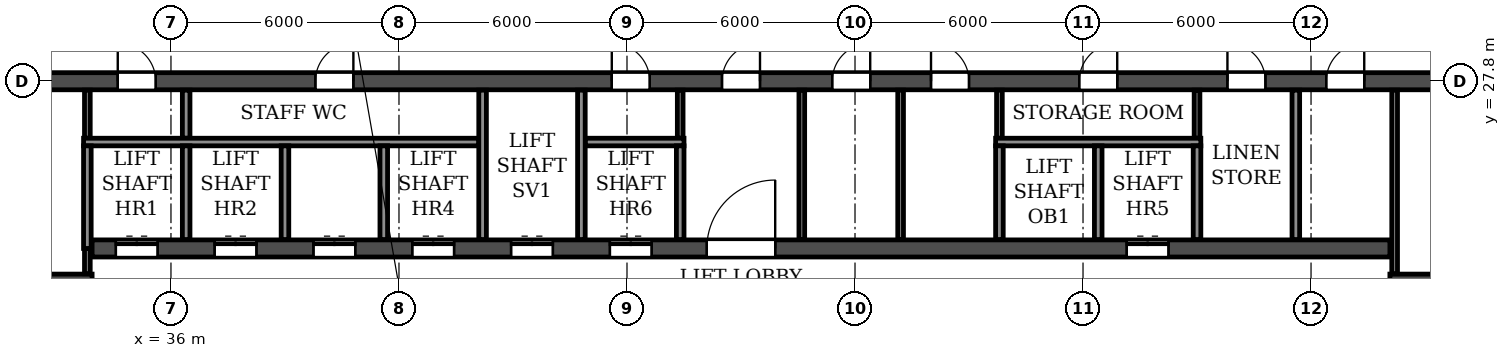
"""IFC4 building model, lengths in metres.
Left out: names, types, materials, properties, quantities, classifications, styles, units other than length and angle.
Written with IfcOpenShell. Run it as: python <this file> out.ifc"""

import sys

from ifc_helpers import new_model, si_unit, direction, frame, frame_2d, origin, place, context, subcontext, project, spatial, rectangle, extrude, element, fill, save


model = new_model("IFC4")
c1 = context("Model", 3, precision=1e-05, world=origin(), true_north=direction((0.0, 1.0)))
c2 = subcontext(c1, "Body", "Model", "MODEL_VIEW")
j1 = project(units=[si_unit("LENGTHUNIT", "METRE"), si_unit("PLANEANGLEUNIT", "RADIAN")], contexts=[c1])
p1 = place(None, origin())
s1 = spatial("IfcSite", under=j1, at=p1, CompositionType="ELEMENT")
p2 = place(p1, origin())
s2 = spatial("IfcBuilding", under=s1, at=p2, CompositionType="ELEMENT")
p3 = place(p2, frame((0.0, 0.0, 132.3)))
s3 = spatial("IfcBuildingStorey", under=s2, at=p3, CompositionType="ELEMENT", Elevation=132.3)
p4 = place(p3, frame((12.2, 27.8, 0.0), z_axis=(0.0, 0.0, 1.0), x_axis=(1.0, 0.0, 0.0)))
e1 = element("IfcWall", 1, at=p4, inside=s3, PredefinedType="SOLIDWALL", context=c2, shape_type="SweptSolid", body=[
    extrude(rectangle(XDim=77.6, YDim=0.45, at=frame_2d((38.8, 0.0))), origin(), (0.0, 0.0, 1.0), 3.07),
])
p5 = place(p4, frame((2.05, 0.0, 0.0)))
e2 = element("IfcOpeningElement", 2, at=p5, cuts=e1, PredefinedType="OPENING", context=c2, shape_type="SweptSolid", body=[
    extrude(rectangle(XDim=1.5, YDim=2.1, at=frame_2d((0.75, 1.05))), frame((0.0, 0.235, 0.0), z_axis=(0.0, -1.0, 0.0), x_axis=(1.0, 0.0, 0.0)), (0.0, 0.0, 1.0), 0.47),
])
p6 = place(p4, frame((6.7, 0.0, 0.0)))
e3 = element("IfcOpeningElement", 3, at=p6, cuts=e1, PredefinedType="OPENING", context=c2, shape_type="SweptSolid", body=[
    extrude(rectangle(XDim=1.0, YDim=2.1, at=frame_2d((0.5, 1.05))), frame((0.0, 0.235, 0.0), z_axis=(0.0, -1.0, 0.0), x_axis=(1.0, 0.0, 0.0)), (0.0, 0.0, 1.0), 0.47),
])
p7 = place(p4, frame((10.05, 0.0, 0.0)))
e4 = element("IfcOpeningElement", 4, at=p7, cuts=e1, PredefinedType="OPENING", context=c2, shape_type="SweptSolid", body=[
    extrude(rectangle(XDim=0.9, YDim=2.1, at=frame_2d((0.45, 1.05))), frame((0.0, 0.235, 0.0), z_axis=(0.0, -1.0, 0.0), x_axis=(1.0, 0.0, 0.0)), (0.0, 0.0, 1.0), 0.47),
])
p8 = place(p4, frame((19.25, 0.0, 0.0)))
e5 = element("IfcOpeningElement", 5, at=p8, cuts=e1, PredefinedType="OPENING", context=c2, shape_type="SweptSolid", body=[
    extrude(rectangle(XDim=0.9, YDim=2.1, at=frame_2d((0.45, 1.05))), frame((0.0, 0.235, 0.0), z_axis=(0.0, -1.0, 0.0), x_axis=(1.0, 0.0, 0.0)), (0.0, 0.0, 1.0), 0.47),
])
p9 = place(p4, frame((22.4, 0.0, 0.0)))
e6 = element("IfcOpeningElement", 6, at=p9, cuts=e1, PredefinedType="OPENING", context=c2, shape_type="SweptSolid", body=[
    extrude(rectangle(XDim=1.0, YDim=2.1, at=frame_2d((0.5, 1.05))), frame((0.0, 0.235, 0.0), z_axis=(0.0, -1.0, 0.0), x_axis=(1.0, 0.0, 0.0)), (0.0, 0.0, 1.0), 0.47),
])
p10 = place(p4, frame((27.6, 0.0, 0.0)))
e7 = element("IfcOpeningElement", 7, at=p10, cuts=e1, PredefinedType="OPENING", context=c2, shape_type="SweptSolid", body=[
    extrude(rectangle(XDim=1.0, YDim=2.1, at=frame_2d((0.5, 1.05))), frame((0.0, 0.235, 0.0), z_axis=(0.0, -1.0, 0.0), x_axis=(1.0, 0.0, 0.0)), (0.0, 0.0, 1.0), 0.47),
])
p11 = place(p4, frame((35.4, 0.0, 0.0)))
e8 = element("IfcOpeningElement", 8, at=p11, cuts=e1, PredefinedType="OPENING", context=c2, shape_type="SweptSolid", body=[
    extrude(rectangle(XDim=1.0, YDim=2.1, at=frame_2d((0.5, 1.05))), frame((0.0, 0.235, 0.0), z_axis=(0.0, -1.0, 0.0), x_axis=(1.0, 0.0, 0.0)), (0.0, 0.0, 1.0), 0.47),
])
p12 = place(p4, frame((38.3, 0.0, 0.0)))
e9 = element("IfcOpeningElement", 9, at=p12, cuts=e1, PredefinedType="OPENING", context=c2, shape_type="SweptSolid", body=[
    extrude(rectangle(XDim=1.0, YDim=2.1, at=frame_2d((0.5, 1.05))), frame((0.0, 0.235, 0.0), z_axis=(0.0, -1.0, 0.0), x_axis=(1.0, 0.0, 0.0)), (0.0, 0.0, 1.0), 0.47),
])
p13 = place(p4, frame((41.2, 0.0, 0.0)))
e10 = element("IfcOpeningElement", 10, at=p13, cuts=e1, PredefinedType="OPENING", context=c2, shape_type="SweptSolid", body=[
    extrude(rectangle(XDim=1.0, YDim=2.1, at=frame_2d((0.5, 1.05))), frame((0.0, 0.235, 0.0), z_axis=(0.0, -1.0, 0.0), x_axis=(1.0, 0.0, 0.0)), (0.0, 0.0, 1.0), 0.47),
])
p14 = place(p4, frame((43.8, 0.0, 0.0)))
e11 = element("IfcOpeningElement", 11, at=p14, cuts=e1, PredefinedType="OPENING", context=c2, shape_type="SweptSolid", body=[
    extrude(rectangle(XDim=1.0, YDim=2.1, at=frame_2d((0.5, 1.05))), frame((0.0, 0.235, 0.0), z_axis=(0.0, -1.0, 0.0), x_axis=(1.0, 0.0, 0.0)), (0.0, 0.0, 1.0), 0.47),
])
p15 = place(p4, frame((47.7, 0.0, 0.0)))
e12 = element("IfcOpeningElement", 12, at=p15, cuts=e1, PredefinedType="OPENING", context=c2, shape_type="SweptSolid", body=[
    extrude(rectangle(XDim=1.0, YDim=2.1, at=frame_2d((0.5, 1.05))), frame((0.0, 0.235, 0.0), z_axis=(0.0, -1.0, 0.0), x_axis=(1.0, 0.0, 0.0)), (0.0, 0.0, 1.0), 0.47),
])
p16 = place(p4, frame((51.6, 0.0, 0.0)))
e13 = element("IfcOpeningElement", 13, at=p16, cuts=e1, PredefinedType="OPENING", context=c2, shape_type="SweptSolid", body=[
    extrude(rectangle(XDim=1.0, YDim=2.1, at=frame_2d((0.5, 1.05))), frame((0.0, 0.235, 0.0), z_axis=(0.0, -1.0, 0.0), x_axis=(1.0, 0.0, 0.0)), (0.0, 0.0, 1.0), 0.47),
])
p17 = place(p4, frame((54.2, 0.0, 0.0)))
e14 = element("IfcOpeningElement", 14, at=p17, cuts=e1, PredefinedType="OPENING", context=c2, shape_type="SweptSolid", body=[
    extrude(rectangle(XDim=1.0, YDim=2.1, at=frame_2d((0.5, 1.05))), frame((0.0, 0.235, 0.0), z_axis=(0.0, -1.0, 0.0), x_axis=(1.0, 0.0, 0.0)), (0.0, 0.0, 1.0), 0.47),
])
p18 = place(p4, frame((57.45, 0.0, 0.0)))
e15 = element("IfcOpeningElement", 15, at=p18, cuts=e1, PredefinedType="OPENING", context=c2, shape_type="SweptSolid", body=[
    extrude(rectangle(XDim=0.9, YDim=2.1, at=frame_2d((0.45, 1.05))), frame((0.0, 0.235, 0.0), z_axis=(0.0, -1.0, 0.0), x_axis=(1.0, 0.0, 0.0)), (0.0, 0.0, 1.0), 0.47),
])
p19 = place(p4, frame((66.65, 0.0, 0.0)))
e16 = element("IfcOpeningElement", 16, at=p19, cuts=e1, PredefinedType="OPENING", context=c2, shape_type="SweptSolid", body=[
    extrude(rectangle(XDim=0.9, YDim=2.1, at=frame_2d((0.45, 1.05))), frame((0.0, 0.235, 0.0), z_axis=(0.0, -1.0, 0.0), x_axis=(1.0, 0.0, 0.0)), (0.0, 0.0, 1.0), 0.47),
])
p20 = place(p4, frame((69.9, 0.0, 0.0)))
e17 = element("IfcOpeningElement", 17, at=p20, cuts=e1, PredefinedType="OPENING", context=c2, shape_type="SweptSolid", body=[
    extrude(rectangle(XDim=1.0, YDim=2.1, at=frame_2d((0.5, 1.05))), frame((0.0, 0.235, 0.0), z_axis=(0.0, -1.0, 0.0), x_axis=(1.0, 0.0, 0.0)), (0.0, 0.0, 1.0), 0.47),
])
p21 = place(p4, frame((74.3, 0.0, 0.0)))
e18 = element("IfcOpeningElement", 18, at=p21, cuts=e1, PredefinedType="OPENING", context=c2, shape_type="SweptSolid", body=[
    extrude(rectangle(XDim=1.0, YDim=2.1, at=frame_2d((0.5, 1.05))), frame((0.0, 0.235, 0.0), z_axis=(0.0, -1.0, 0.0), x_axis=(1.0, 0.0, 0.0)), (0.0, 0.0, 1.0), 0.47),
])
p22 = place(p3, frame((33.925, 23.4, 0.0), z_axis=(0.0, 0.0, 1.0), x_axis=(1.0, 0.0, 0.0)))
e19 = element("IfcWall", 19, at=p22, inside=s3, PredefinedType="SOLIDWALL", context=c2, shape_type="SweptSolid", body=[
    extrude(rectangle(XDim=34.15, YDim=0.45, at=frame_2d((17.075, 0.0))), origin(), (0.0, 0.0, 1.0), 3.07),
])
p23 = place(p22, frame((16.175, 0.0, 0.0)))
e20 = element("IfcOpeningElement", 20, at=p23, cuts=e19, PredefinedType="OPENING", context=c2, shape_type="SweptSolid", body=[
    extrude(rectangle(XDim=1.8, YDim=2.1, at=frame_2d((0.9, 1.05))), frame((0.0, 0.235, 0.0), z_axis=(0.0, -1.0, 0.0), x_axis=(1.0, 0.0, 0.0)), (0.0, 0.0, 1.0), 0.47),
])
p24 = place(p22, frame((0.625, 0.0, 0.0)))
e21 = element("IfcOpeningElement", 21, at=p24, cuts=e19, PredefinedType="OPENING", context=c2, shape_type="SweptSolid", body=[
    extrude(rectangle(XDim=1.1, YDim=2.1, at=frame_2d((0.55, 1.05))), frame((0.0, 0.235, 0.0), z_axis=(0.0, -1.0, 0.0), x_axis=(1.0, 0.0, 0.0)), (0.0, 0.0, 1.0), 0.47),
])
p25 = place(p22, frame((3.225, 0.0, 0.0)))
e22 = element("IfcOpeningElement", 22, at=p25, cuts=e19, PredefinedType="OPENING", context=c2, shape_type="SweptSolid", body=[
    extrude(rectangle(XDim=1.1, YDim=2.1, at=frame_2d((0.55, 1.05))), frame((0.0, 0.235, 0.0), z_axis=(0.0, -1.0, 0.0), x_axis=(1.0, 0.0, 0.0)), (0.0, 0.0, 1.0), 0.47),
])
p26 = place(p22, frame((5.825, 0.0, 0.0)))
e23 = element("IfcOpeningElement", 23, at=p26, cuts=e19, PredefinedType="OPENING", context=c2, shape_type="SweptSolid", body=[
    extrude(rectangle(XDim=1.1, YDim=2.1, at=frame_2d((0.55, 1.05))), frame((0.0, 0.235, 0.0), z_axis=(0.0, -1.0, 0.0), x_axis=(1.0, 0.0, 0.0)), (0.0, 0.0, 1.0), 0.47),
])
p27 = place(p22, frame((8.425, 0.0, 0.0)))
e24 = element("IfcOpeningElement", 24, at=p27, cuts=e19, PredefinedType="OPENING", context=c2, shape_type="SweptSolid", body=[
    extrude(rectangle(XDim=1.1, YDim=2.1, at=frame_2d((0.55, 1.05))), frame((0.0, 0.235, 0.0), z_axis=(0.0, -1.0, 0.0), x_axis=(1.0, 0.0, 0.0)), (0.0, 0.0, 1.0), 0.47),
])
p28 = place(p22, frame((11.025, 0.0, 0.0)))
e25 = element("IfcOpeningElement", 25, at=p28, cuts=e19, PredefinedType="OPENING", context=c2, shape_type="SweptSolid", body=[
    extrude(rectangle(XDim=1.1, YDim=2.1, at=frame_2d((0.55, 1.05))), frame((0.0, 0.235, 0.0), z_axis=(0.0, -1.0, 0.0), x_axis=(1.0, 0.0, 0.0)), (0.0, 0.0, 1.0), 0.47),
])
p29 = place(p22, frame((13.625, 0.0, 0.0)))
e26 = element("IfcOpeningElement", 26, at=p29, cuts=e19, PredefinedType="OPENING", context=c2, shape_type="SweptSolid", body=[
    extrude(rectangle(XDim=1.1, YDim=2.1, at=frame_2d((0.55, 1.05))), frame((0.0, 0.235, 0.0), z_axis=(0.0, -1.0, 0.0), x_axis=(1.0, 0.0, 0.0)), (0.0, 0.0, 1.0), 0.47),
])
p30 = place(p22, frame((27.225, 0.0, 0.0)))
e27 = element("IfcOpeningElement", 27, at=p30, cuts=e19, PredefinedType="OPENING", context=c2, shape_type="SweptSolid", body=[
    extrude(rectangle(XDim=1.1, YDim=2.1, at=frame_2d((0.55, 1.05))), frame((0.0, 0.235, 0.0), z_axis=(0.0, -1.0, 0.0), x_axis=(1.0, 0.0, 0.0)), (0.0, 0.0, 1.0), 0.47),
])
for number, where, z_axis, x_axis in (
    (28, (29.875, 22.6, 0.0), (0.0, 0.0, 1.0), (1.0, 0.0, 0.0)),
    (29, (68.075, 22.6, 0.0), (0.0, 0.0, 1.0), (1.0, 0.0, 0.0)),
):
    element("IfcWall", number, at=place(p3, frame(where, z_axis=z_axis, x_axis=x_axis)), inside=s3, PredefinedType="SOLIDWALL", context=c2, shape_type="SweptSolid", body=[
        extrude(rectangle(XDim=4.05, YDim=0.25, at=frame_2d((2.025, 0.0))), origin(), (0.0, 0.0, 1.0), 3.07),
    ])
p31 = place(p3, frame((49.4, 26.3, 0.0), z_axis=(0.0, 0.0, 1.0), x_axis=(0.0, 1.0, 0.0)))
e30 = element("IfcWall", 30, at=p31, inside=s3, PredefinedType="PARTITIONING", context=c2, shape_type="SweptSolid", body=[
    extrude(rectangle(XDim=1.265, YDim=0.15, at=frame_2d((0.632, 0.0))), origin(), (0.0, 0.0, 1.0), 3.07),
])
for number, where, z_axis, x_axis in (
    (31, (52.6, 23.635, 0.0), (0.0, 0.0, 1.0), (0.0, 1.0, 0.0)),
    (32, (55.2, 23.635, 0.0), (0.0, 0.0, 1.0), (0.0, 1.0, 0.0)),
):
    element("IfcWall", number, at=place(p3, frame(where, z_axis=z_axis, x_axis=x_axis)), inside=s3, PredefinedType="PARTITIONING", context=c2, shape_type="SweptSolid", body=[
        extrude(rectangle(XDim=3.93, YDim=0.15, at=frame_2d((1.965, 0.0))), origin(), (0.0, 0.0, 1.0), 3.07),
    ])
for number, where, z_axis, x_axis in (
    (33, (57.8, 26.3, 0.0), (0.0, 0.0, 1.0), (0.0, 1.0, 0.0)),
    (34, (63.0, 26.3, 0.0), (0.0, 0.0, 1.0), (0.0, 1.0, 0.0)),
):
    element("IfcWall", number, at=place(p3, frame(where, z_axis=z_axis, x_axis=x_axis)), inside=s3, PredefinedType="PARTITIONING", context=c2, shape_type="SweptSolid", body=[
        extrude(rectangle(XDim=1.265, YDim=0.15, at=frame_2d((0.632, 0.0))), origin(), (0.0, 0.0, 1.0), 3.07),
    ])
p32 = place(p3, frame((36.4, 26.3, 0.0), z_axis=(0.0, 0.0, 1.0), x_axis=(0.0, 1.0, 0.0)))
e35 = element("IfcWall", 35, at=p32, inside=s3, PredefinedType="PARTITIONING", context=c2, shape_type="SweptSolid", body=[
    extrude(rectangle(XDim=1.265, YDim=0.2, at=frame_2d((0.632, 0.0))), origin(), (0.0, 0.0, 1.0), 3.07),
])
p33 = place(p3, frame((65.6, 23.635, 0.0), z_axis=(0.0, 0.0, 1.0), x_axis=(0.0, 1.0, 0.0)))
e36 = element("IfcWall", 36, at=p33, inside=s3, PredefinedType="PARTITIONING", context=c2, shape_type="SweptSolid", body=[
    extrude(rectangle(XDim=3.93, YDim=0.2, at=frame_2d((1.965, 0.0))), origin(), (0.0, 0.0, 1.0), 3.07),
])
p34 = place(p3, frame((33.8, 22.735, 0.0), z_axis=(0.0, 0.0, 1.0), x_axis=(0.0, 1.0, 0.0)))
e37 = element("IfcWall", 37, at=p34, inside=s3, PredefinedType="PARTITIONING", context=c2, shape_type="SweptSolid", body=[
    extrude(rectangle(XDim=0.665, YDim=0.15, at=frame_2d((0.333, 0.0))), origin(), (0.0, 0.0, 1.0), 3.07),
])
p35 = place(p3, frame((33.8, 26.3, 0.0), z_axis=(0.0, 0.0, 1.0), x_axis=(0.0, 1.0, 0.0)))
e38 = element("IfcWall", 38, at=p35, inside=s3, PredefinedType="PARTITIONING", context=c2, shape_type="SweptSolid", body=[
    extrude(rectangle(XDim=1.265, YDim=0.15, at=frame_2d((0.632, 0.0))), origin(), (0.0, 0.0, 1.0), 3.07),
])
p36 = place(p3, frame((68.2, 22.735, 0.0), z_axis=(0.0, 0.0, 1.0), x_axis=(0.0, 1.0, 0.0)))
e39 = element("IfcWall", 39, at=p36, inside=s3, PredefinedType="PARTITIONING", context=c2, shape_type="SweptSolid", body=[
    extrude(rectangle(XDim=4.83, YDim=0.15, at=frame_2d((2.415, 0.0))), origin(), (0.0, 0.0, 1.0), 3.07),
])
p37 = place(p3, frame((33.7, 26.2, 0.0), z_axis=(0.0, 0.0, 1.0), x_axis=(1.0, 0.0, 0.0)))
e40 = element("IfcWall", 40, at=p37, inside=s3, PredefinedType="PARTITIONING", context=c2, shape_type="SweptSolid", body=[
    extrude(rectangle(XDim=10.4, YDim=0.2, at=frame_2d((5.2, 0.0))), origin(), (0.0, 0.0, 1.0), 3.07),
])
p38 = place(p3, frame((46.9, 26.2, 0.0), z_axis=(0.0, 0.0, 1.0), x_axis=(1.0, 0.0, 0.0)))
e41 = element("IfcWall", 41, at=p38, inside=s3, PredefinedType="PARTITIONING", context=c2, shape_type="SweptSolid", body=[
    extrude(rectangle(XDim=2.6, YDim=0.2, at=frame_2d((1.3, 0.0))), origin(), (0.0, 0.0, 1.0), 3.07),
])
p39 = place(p3, frame((57.7, 26.2, 0.0), z_axis=(0.0, 0.0, 1.0), x_axis=(1.0, 0.0, 0.0)))
e42 = element("IfcWall", 42, at=p39, inside=s3, PredefinedType="PARTITIONING", context=c2, shape_type="SweptSolid", body=[
    extrude(rectangle(XDim=5.4, YDim=0.2, at=frame_2d((2.7, 0.0))), origin(), (0.0, 0.0, 1.0), 3.07),
])
p40 = place(p3, frame((33.8, 23.4, 0.0), z_axis=(0.0, 0.0, 1.0), x_axis=(0.0, 1.0, 0.0)))
e43 = element("IfcWall", 43, at=p40, inside=s3, PredefinedType="PARTITIONING", context=c2, shape_type="SweptSolid", body=[
    extrude(rectangle(XDim=2.7, YDim=0.2, at=frame_2d((1.35, 0.0))), origin(), (0.0, 0.0, 1.0), 3.07),
])
for number, where, z_axis, x_axis in (
    (44, (36.4, 23.635, 0.0), (0.0, 0.0, 1.0), (0.0, 1.0, 0.0)),
    (45, (39.0, 23.635, 0.0), (0.0, 0.0, 1.0), (0.0, 1.0, 0.0)),
    (46, (41.6, 23.635, 0.0), (0.0, 0.0, 1.0), (0.0, 1.0, 0.0)),
):
    element("IfcWall", number, at=place(p3, frame(where, z_axis=z_axis, x_axis=x_axis)), inside=s3, PredefinedType="PARTITIONING", context=c2, shape_type="SweptSolid", body=[
        extrude(rectangle(XDim=2.465, YDim=0.2, at=frame_2d((1.232, 0.0))), origin(), (0.0, 0.0, 1.0), 3.07),
    ])
for number, where, z_axis, x_axis in (
    (47, (44.2, 23.635, 0.0), (0.0, 0.0, 1.0), (0.0, 1.0, 0.0)),
    (48, (46.8, 23.635, 0.0), (0.0, 0.0, 1.0), (0.0, 1.0, 0.0)),
):
    element("IfcWall", number, at=place(p3, frame(where, z_axis=z_axis, x_axis=x_axis)), inside=s3, PredefinedType="PARTITIONING", context=c2, shape_type="SweptSolid", body=[
        extrude(rectangle(XDim=3.93, YDim=0.2, at=frame_2d((1.965, 0.0))), origin(), (0.0, 0.0, 1.0), 3.07),
    ])
for number, where, z_axis, x_axis in (
    (49, (49.4, 23.635, 0.0), (0.0, 0.0, 1.0), (0.0, 1.0, 0.0)),
    (50, (57.8, 23.635, 0.0), (0.0, 0.0, 1.0), (0.0, 1.0, 0.0)),
    (51, (60.4, 23.635, 0.0), (0.0, 0.0, 1.0), (0.0, 1.0, 0.0)),
    (52, (63.0, 23.635, 0.0), (0.0, 0.0, 1.0), (0.0, 1.0, 0.0)),
):
    element("IfcWall", number, at=place(p3, frame(where, z_axis=z_axis, x_axis=x_axis)), inside=s3, PredefinedType="PARTITIONING", context=c2, shape_type="SweptSolid", body=[
        extrude(rectangle(XDim=2.465, YDim=0.2, at=frame_2d((1.232, 0.0))), origin(), (0.0, 0.0, 1.0), 3.07),
    ])
p41 = place(p9, origin())
e53 = element("IfcDoor", 53, at=p41, inside=s3, OperationType="SINGLE_SWING_LEFT", PredefinedType="DOOR", context=c2, shape_type="SweptSolid", body=[
    extrude(rectangle(XDim=1.0, YDim=2.1, at=frame_2d((0.5, 1.05))), frame((0.0, 0.025, 0.0), z_axis=(0.0, -1.0, 0.0), x_axis=(1.0, 0.0, 0.0)), (0.0, 0.0, 1.0), 0.05),
])
fill(e6, e53)
p42 = place(p10, origin())
e54 = element("IfcDoor", 54, at=p42, inside=s3, OperationType="SINGLE_SWING_RIGHT", PredefinedType="DOOR", context=c2, shape_type="SweptSolid", body=[
    extrude(rectangle(XDim=1.0, YDim=2.1, at=frame_2d((0.5, 1.05))), frame((0.0, 0.025, 0.0), z_axis=(0.0, -1.0, 0.0), x_axis=(1.0, 0.0, 0.0)), (0.0, 0.0, 1.0), 0.05),
])
fill(e7, e54)
p43 = place(p11, origin())
e55 = element("IfcDoor", 55, at=p43, inside=s3, OperationType="SINGLE_SWING_LEFT", PredefinedType="DOOR", context=c2, shape_type="SweptSolid", body=[
    extrude(rectangle(XDim=1.0, YDim=2.1, at=frame_2d((0.5, 1.05))), frame((0.0, 0.025, 0.0), z_axis=(0.0, -1.0, 0.0), x_axis=(1.0, 0.0, 0.0)), (0.0, 0.0, 1.0), 0.05),
])
fill(e8, e55)
p44 = place(p12, origin())
e56 = element("IfcDoor", 56, at=p44, inside=s3, OperationType="SINGLE_SWING_RIGHT", PredefinedType="DOOR", context=c2, shape_type="SweptSolid", body=[
    extrude(rectangle(XDim=1.0, YDim=2.1, at=frame_2d((0.5, 1.05))), frame((0.0, 0.025, 0.0), z_axis=(0.0, -1.0, 0.0), x_axis=(1.0, 0.0, 0.0)), (0.0, 0.0, 1.0), 0.05),
])
fill(e9, e56)
p45 = place(p13, origin())
e57 = element("IfcDoor", 57, at=p45, inside=s3, OperationType="SINGLE_SWING_RIGHT", PredefinedType="DOOR", context=c2, shape_type="SweptSolid", body=[
    extrude(rectangle(XDim=1.0, YDim=2.1, at=frame_2d((0.5, 1.05))), frame((0.0, 0.025, 0.0), z_axis=(0.0, -1.0, 0.0), x_axis=(1.0, 0.0, 0.0)), (0.0, 0.0, 1.0), 0.05),
])
fill(e10, e57)
p46 = place(p14, origin())
e58 = element("IfcDoor", 58, at=p46, inside=s3, OperationType="SINGLE_SWING_LEFT", PredefinedType="DOOR", context=c2, shape_type="SweptSolid", body=[
    extrude(rectangle(XDim=1.0, YDim=2.1, at=frame_2d((0.5, 1.05))), frame((0.0, 0.025, 0.0), z_axis=(0.0, -1.0, 0.0), x_axis=(1.0, 0.0, 0.0)), (0.0, 0.0, 1.0), 0.05),
])
fill(e11, e58)
p47 = place(p15, origin())
e59 = element("IfcDoor", 59, at=p47, inside=s3, OperationType="SINGLE_SWING_RIGHT", PredefinedType="DOOR", context=c2, shape_type="SweptSolid", body=[
    extrude(rectangle(XDim=1.0, YDim=2.1, at=frame_2d((0.5, 1.05))), frame((0.0, 0.025, 0.0), z_axis=(0.0, -1.0, 0.0), x_axis=(1.0, 0.0, 0.0)), (0.0, 0.0, 1.0), 0.05),
])
fill(e12, e59)
p48 = place(p16, origin())
e60 = element("IfcDoor", 60, at=p48, inside=s3, OperationType="SINGLE_SWING_LEFT", PredefinedType="DOOR", context=c2, shape_type="SweptSolid", body=[
    extrude(rectangle(XDim=1.0, YDim=2.1, at=frame_2d((0.5, 1.05))), frame((0.0, 0.025, 0.0), z_axis=(0.0, -1.0, 0.0), x_axis=(1.0, 0.0, 0.0)), (0.0, 0.0, 1.0), 0.05),
])
fill(e13, e60)
p49 = place(p17, origin())
e61 = element("IfcDoor", 61, at=p49, inside=s3, OperationType="SINGLE_SWING_RIGHT", PredefinedType="DOOR", context=c2, shape_type="SweptSolid", body=[
    extrude(rectangle(XDim=1.0, YDim=2.1, at=frame_2d((0.5, 1.05))), frame((0.0, 0.025, 0.0), z_axis=(0.0, -1.0, 0.0), x_axis=(1.0, 0.0, 0.0)), (0.0, 0.0, 1.0), 0.05),
])
fill(e14, e61)
p50 = place(p23, origin())
e62 = element("IfcDoor", 62, at=p50, inside=s3, OperationType="DOUBLE_DOOR_SINGLE_SWING", PredefinedType="DOOR", context=c2, shape_type="SweptSolid", body=[
    extrude(rectangle(XDim=1.8, YDim=2.1, at=frame_2d((0.9, 1.05))), frame((0.0, 0.025, 0.0), z_axis=(0.0, -1.0, 0.0), x_axis=(1.0, 0.0, 0.0)), (0.0, 0.0, 1.0), 0.05),
])
fill(e20, e62)
p51 = place(p24, origin())
e63 = element("IfcDoor", 63, at=p51, inside=s3, OperationType="DOUBLE_DOOR_SLIDING", PredefinedType="DOOR", context=c2, shape_type="SweptSolid", body=[
    extrude(rectangle(XDim=1.1, YDim=2.1, at=frame_2d((0.55, 1.05))), frame((0.0, 0.025, 0.0), z_axis=(0.0, -1.0, 0.0), x_axis=(1.0, 0.0, 0.0)), (0.0, 0.0, 1.0), 0.05),
])
fill(e21, e63)
p52 = place(p25, origin())
e64 = element("IfcDoor", 64, at=p52, inside=s3, OperationType="DOUBLE_DOOR_SLIDING", PredefinedType="DOOR", context=c2, shape_type="SweptSolid", body=[
    extrude(rectangle(XDim=1.1, YDim=2.1, at=frame_2d((0.55, 1.05))), frame((0.0, 0.025, 0.0), z_axis=(0.0, -1.0, 0.0), x_axis=(1.0, 0.0, 0.0)), (0.0, 0.0, 1.0), 0.05),
])
fill(e22, e64)
p53 = place(p26, origin())
e65 = element("IfcDoor", 65, at=p53, inside=s3, OperationType="DOUBLE_DOOR_SLIDING", PredefinedType="DOOR", context=c2, shape_type="SweptSolid", body=[
    extrude(rectangle(XDim=1.1, YDim=2.1, at=frame_2d((0.55, 1.05))), frame((0.0, 0.025, 0.0), z_axis=(0.0, -1.0, 0.0), x_axis=(1.0, 0.0, 0.0)), (0.0, 0.0, 1.0), 0.05),
])
fill(e23, e65)
p54 = place(p27, origin())
e66 = element("IfcDoor", 66, at=p54, inside=s3, OperationType="DOUBLE_DOOR_SLIDING", PredefinedType="DOOR", context=c2, shape_type="SweptSolid", body=[
    extrude(rectangle(XDim=1.1, YDim=2.1, at=frame_2d((0.55, 1.05))), frame((0.0, 0.025, 0.0), z_axis=(0.0, -1.0, 0.0), x_axis=(1.0, 0.0, 0.0)), (0.0, 0.0, 1.0), 0.05),
])
fill(e24, e66)
p55 = place(p28, origin())
e67 = element("IfcDoor", 67, at=p55, inside=s3, OperationType="DOUBLE_DOOR_SLIDING", PredefinedType="DOOR", context=c2, shape_type="SweptSolid", body=[
    extrude(rectangle(XDim=1.1, YDim=2.1, at=frame_2d((0.55, 1.05))), frame((0.0, 0.025, 0.0), z_axis=(0.0, -1.0, 0.0), x_axis=(1.0, 0.0, 0.0)), (0.0, 0.0, 1.0), 0.05),
])
fill(e25, e67)
p56 = place(p29, origin())
e68 = element("IfcDoor", 68, at=p56, inside=s3, OperationType="DOUBLE_DOOR_SLIDING", PredefinedType="DOOR", context=c2, shape_type="SweptSolid", body=[
    extrude(rectangle(XDim=1.1, YDim=2.1, at=frame_2d((0.55, 1.05))), frame((0.0, 0.025, 0.0), z_axis=(0.0, -1.0, 0.0), x_axis=(1.0, 0.0, 0.0)), (0.0, 0.0, 1.0), 0.05),
])
fill(e26, e68)
p57 = place(p30, origin())
e69 = element("IfcDoor", 69, at=p57, inside=s3, OperationType="DOUBLE_DOOR_SLIDING", PredefinedType="DOOR", context=c2, shape_type="SweptSolid", body=[
    extrude(rectangle(XDim=1.1, YDim=2.1, at=frame_2d((0.55, 1.05))), frame((0.0, 0.025, 0.0), z_axis=(0.0, -1.0, 0.0), x_axis=(1.0, 0.0, 0.0)), (0.0, 0.0, 1.0), 0.05),
])
fill(e27, e69)
save(model, sys.argv[1])
